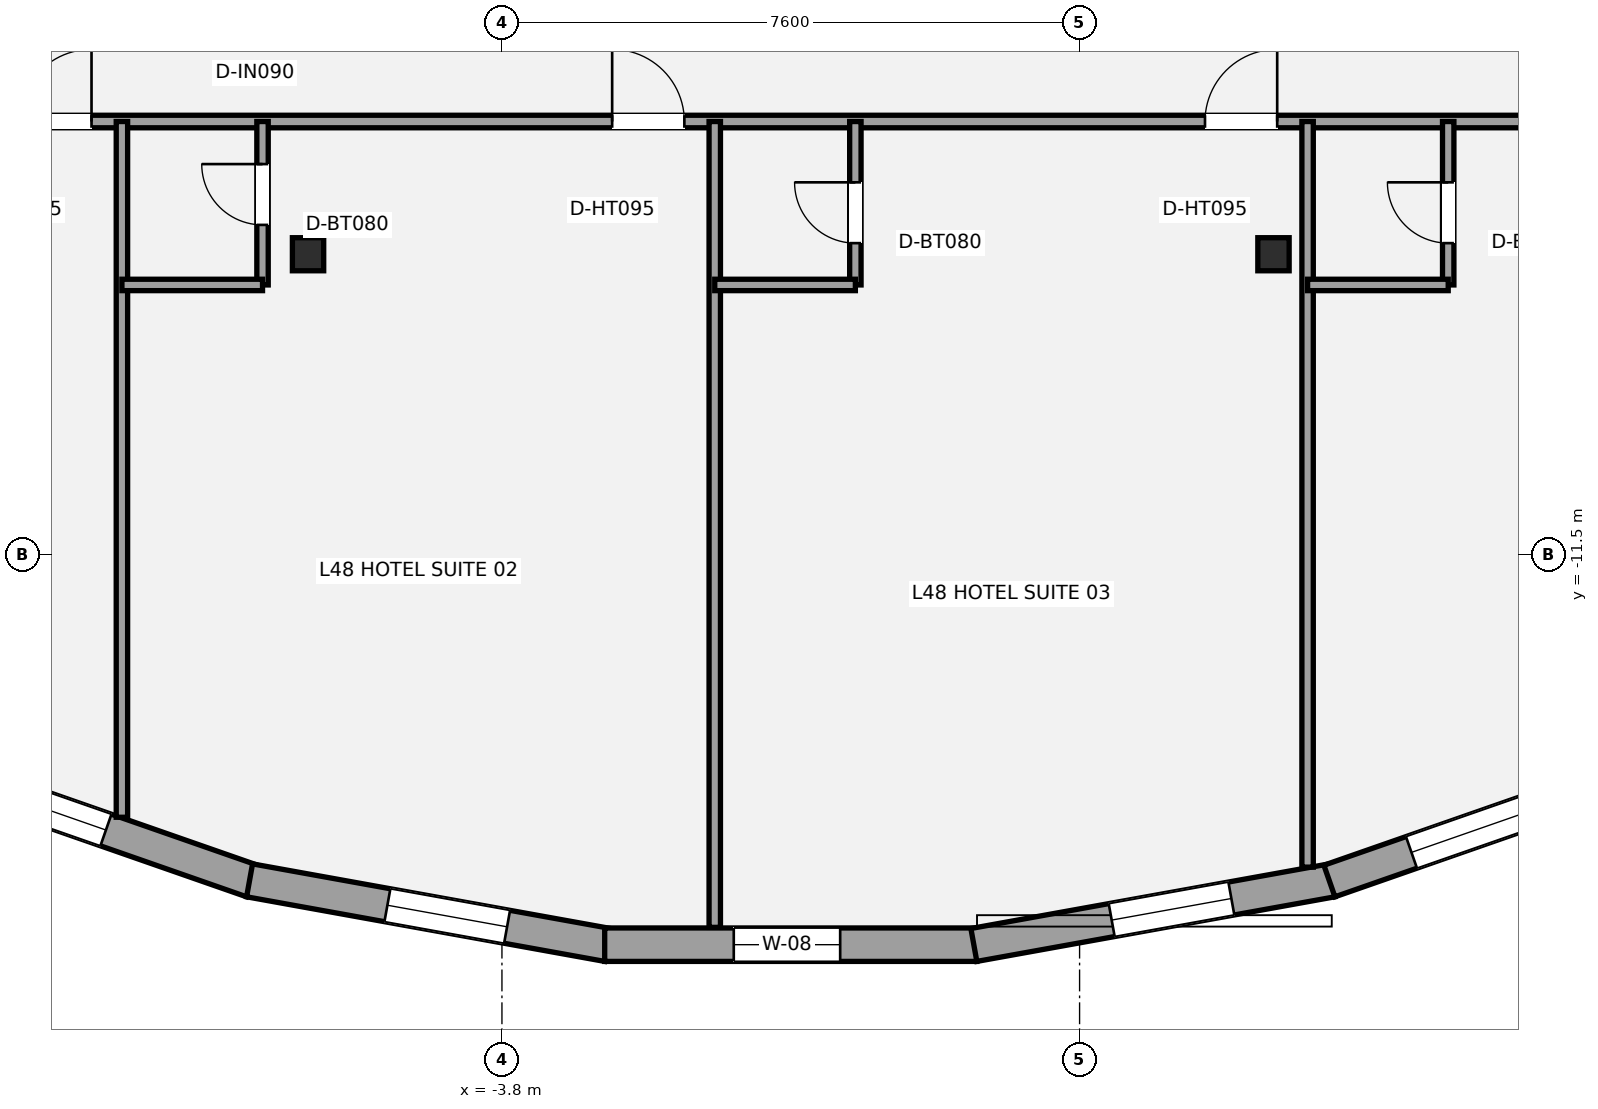
"""IFC4 building model, lengths in metres.
Left out: names, types, materials, properties, quantities, classifications, styles, units other than length and angle.
Written with IfcOpenShell. Run it as: python <this file> out.ifc"""

import sys

from ifc_helpers import new_model, si_unit, direction, frame, frame_2d, origin, origin_2d, place, context, subcontext, project, spatial, rectangle, i_section, extrude, element, fill, save


model = new_model("IFC4")
c1 = context("Model", 3, precision=1e-05, world=origin(), true_north=direction((0.0, 1.0)))
c2 = subcontext(c1, "Body", "Model", "MODEL_VIEW")
j1 = project(units=[si_unit("LENGTHUNIT", "METRE"), si_unit("PLANEANGLEUNIT", "RADIAN")], contexts=[c1])
p1 = place(None, origin())
s1 = spatial("IfcSite", under=j1, at=p1, CompositionType="ELEMENT")
p2 = place(p1, origin())
s2 = spatial("IfcBuilding", under=s1, at=p2, CompositionType="ELEMENT")
p3 = place(p2, frame((0.0, 0.0, 175.8)))
s3 = spatial("IfcBuildingStorey", under=s2, at=p3, CompositionType="ELEMENT", Elevation=175.8)
for number, where, z_axis, x_axis in (
    (1, (-6.351, -7.546, 0.0), (0.0, 0.0, 1.0), (1.0, 0.0, 0.0)),
    (2, (6.351, -7.546, 0.0), (0.0, 0.0, 1.0), (1.0, 0.0, 0.0)),
):
    element("IfcColumn", number, at=place(p3, frame(where, z_axis=z_axis, x_axis=x_axis)), inside=s3, PredefinedType="COLUMN", context=c2, shape_type="SweptSolid", body=[
        extrude(i_section(OverallWidth=0.412, OverallDepth=0.435, WebThickness=0.036, FlangeThickness=0.057, at=origin_2d()), origin(), (0.0, 0.0, 1.0), 3.2),
    ])
p4 = place(p3, frame((-7.087, -15.792, 0.0), z_axis=(0.0, 0.0, 1.0), x_axis=(-0.944223944927, 0.329304026434, 0.0)))
e3 = element("IfcWall", 3, at=p4, inside=s3, PredefinedType="STANDARD", context=c2, shape_type="SweptSolid", body=[
    extrude(rectangle(XDim=4.532, YDim=0.44, at=frame_2d((2.266, 0.0))), origin(), (0.0, 0.0, 1.0), 2.315),
])
p5 = place(p4, frame((2.037, 0.0, 0.58)))
e4 = element("IfcOpeningElement", 4, at=p5, cuts=e3, PredefinedType="OPENING", context=c2, shape_type="SweptSolid", body=[
    extrude(rectangle(XDim=1.6, YDim=1.55, at=frame_2d((0.8, 0.775))), frame((0.0, 0.23, 0.0), z_axis=(0.0, -1.0, 0.0), x_axis=(1.0, 0.0, 0.0)), (0.0, 0.0, 1.0), 0.46),
])
p6 = place(p3, frame((-2.409, -16.633, 0.0), z_axis=(0.0, 0.0, 1.0), x_axis=(-0.984108907768, 0.177565924803, 0.0)))
e5 = element("IfcWall", 5, at=p6, inside=s3, PredefinedType="STANDARD", context=c2, shape_type="SweptSolid", body=[
    extrude(rectangle(XDim=4.788, YDim=0.44, at=frame_2d((2.394, 0.0))), origin(), (0.0, 0.0, 1.0), 2.315),
])
p7 = place(p6, frame((1.345, 0.0, 0.58)))
e6 = element("IfcOpeningElement", 6, at=p7, cuts=e5, PredefinedType="OPENING", context=c2, shape_type="SweptSolid", body=[
    extrude(rectangle(XDim=1.6, YDim=1.55, at=frame_2d((0.8, 0.775))), frame((0.0, 0.23, 0.0), z_axis=(0.0, -1.0, 0.0), x_axis=(1.0, 0.0, 0.0)), (0.0, 0.0, 1.0), 0.46),
])
p8 = place(p3, frame((2.448, -16.63, 0.0), z_axis=(0.0, 0.0, 1.0), x_axis=(-1.0, 0.0, 0.0)))
e7 = element("IfcWall", 7, at=p8, inside=s3, PredefinedType="STANDARD", context=c2, shape_type="SweptSolid", body=[
    extrude(rectangle(XDim=4.896, YDim=0.44, at=frame_2d((2.448, 0.0))), origin(), (0.0, 0.0, 1.0), 2.315),
])
p9 = place(p8, frame((1.798, 0.0, 0.45)))
e8 = element("IfcOpeningElement", 8, at=p9, cuts=e7, PredefinedType="OPENING", context=c2, shape_type="SweptSolid", body=[
    extrude(rectangle(XDim=1.4, YDim=1.55, at=frame_2d((0.7, 0.775))), frame((0.0, 0.23, 0.0), z_axis=(0.0, -1.0, 0.0), x_axis=(1.0, 0.0, 0.0)), (0.0, 0.0, 1.0), 0.46),
])
p10 = place(p3, frame((7.12, -15.783, 0.0), z_axis=(0.0, 0.0, 1.0), x_axis=(-0.984108907768, -0.177565924803, 0.0)))
e9 = element("IfcWall", 9, at=p10, inside=s3, PredefinedType="STANDARD", context=c2, shape_type="SweptSolid", body=[
    extrude(rectangle(XDim=4.788, YDim=0.44, at=frame_2d((2.394, 0.0))), origin(), (0.0, 0.0, 1.0), 2.315),
])
p11 = place(p10, frame((1.345, 0.0, 0.58)))
e10 = element("IfcOpeningElement", 10, at=p11, cuts=e9, PredefinedType="OPENING", context=c2, shape_type="SweptSolid", body=[
    extrude(rectangle(XDim=1.6, YDim=1.55, at=frame_2d((0.8, 0.775))), frame((0.0, 0.23, 0.0), z_axis=(0.0, -1.0, 0.0), x_axis=(1.0, 0.0, 0.0)), (0.0, 0.0, 1.0), 0.46),
])
p12 = place(p3, frame((11.366, -14.3, 0.0), z_axis=(0.0, 0.0, 1.0), x_axis=(-0.944223944927, -0.329304026434, 0.0)))
e11 = element("IfcWall", 11, at=p12, inside=s3, PredefinedType="STANDARD", context=c2, shape_type="SweptSolid", body=[
    extrude(rectangle(XDim=4.532, YDim=0.44, at=frame_2d((2.266, 0.0))), origin(), (0.0, 0.0, 1.0), 2.315),
])
p13 = place(p12, frame((1.789, 0.0, 0.58)))
e12 = element("IfcOpeningElement", 12, at=p13, cuts=e11, PredefinedType="OPENING", context=c2, shape_type="SweptSolid", body=[
    extrude(rectangle(XDim=1.6, YDim=1.55, at=frame_2d((0.8, 0.775))), frame((0.0, 0.23, 0.0), z_axis=(0.0, -1.0, 0.0), x_axis=(1.0, 0.0, 0.0)), (0.0, 0.0, 1.0), 0.46),
])
p14 = place(p3, frame((-15.55, -5.8, 0.0), z_axis=(0.0, 0.0, 1.0), x_axis=(1.0, 0.0, 0.0)))
e13 = element("IfcWall", 13, at=p14, inside=s3, PredefinedType="PARTITIONING", context=c2, shape_type="SweptSolid", body=[
    extrude(rectangle(XDim=31.1, YDim=0.165, at=frame_2d((15.55, 0.0))), origin(), (0.0, 0.0, 1.0), 2.398),
])
p15 = place(p14, frame((5.4, 0.0, 0.0)))
e14 = element("IfcOpeningElement", 14, at=p15, cuts=e13, PredefinedType="OPENING", context=c2, shape_type="SweptSolid", body=[
    extrude(rectangle(XDim=0.95, YDim=2.15, at=frame_2d((0.475, 1.075))), frame((0.0, 0.093, 0.0), z_axis=(0.0, -1.0, 0.0), x_axis=(1.0, 0.0, 0.0)), (0.0, 0.0, 1.0), 0.185),
])
p16 = place(p14, frame((13.2, 0.0, 0.0)))
e15 = element("IfcOpeningElement", 15, at=p16, cuts=e13, PredefinedType="OPENING", context=c2, shape_type="SweptSolid", body=[
    extrude(rectangle(XDim=0.95, YDim=2.15, at=frame_2d((0.475, 1.075))), frame((0.0, 0.093, 0.0), z_axis=(0.0, -1.0, 0.0), x_axis=(1.0, 0.0, 0.0)), (0.0, 0.0, 1.0), 0.185),
])
p17 = place(p14, frame((21.0, 0.0, 0.0)))
e16 = element("IfcOpeningElement", 16, at=p17, cuts=e13, PredefinedType="OPENING", context=c2, shape_type="SweptSolid", body=[
    extrude(rectangle(XDim=0.95, YDim=2.15, at=frame_2d((0.475, 1.075))), frame((0.0, 0.093, 0.0), z_axis=(0.0, -1.0, 0.0), x_axis=(1.0, 0.0, 0.0)), (0.0, 0.0, 1.0), 0.185),
])
p18 = place(p14, frame((29.75, 0.0, 0.0)))
e17 = element("IfcOpeningElement", 17, at=p18, cuts=e13, PredefinedType="OPENING", context=c2, shape_type="SweptSolid", body=[
    extrude(rectangle(XDim=0.95, YDim=2.15, at=frame_2d((0.475, 1.075))), frame((0.0, 0.093, 0.0), z_axis=(0.0, -1.0, 0.0), x_axis=(1.0, 0.0, 0.0)), (0.0, 0.0, 1.0), 0.185),
])
p19 = place(p3, frame((-8.8, -14.953, 0.0), z_axis=(0.0, 0.0, 1.0), x_axis=(0.0, 1.0, 0.0)))
e18 = element("IfcWall", 18, at=p19, inside=s3, PredefinedType="PLUMBINGWALL", context=c2, shape_type="SweptSolid", body=[
    extrude(rectangle(XDim=9.153, YDim=0.15, at=frame_2d((4.577, 0.0))), origin(), (0.0, 0.0, 1.0), 3.02),
])
p20 = place(p3, frame((-1.0, -16.402, 0.0), z_axis=(0.0, 0.0, 1.0), x_axis=(0.0, 1.0, 0.0)))
e19 = element("IfcWall", 19, at=p20, inside=s3, PredefinedType="PLUMBINGWALL", context=c2, shape_type="SweptSolid", body=[
    extrude(rectangle(XDim=10.602, YDim=0.15, at=frame_2d((5.301, 0.0))), origin(), (0.0, 0.0, 1.0), 2.473),
])
p21 = place(p3, frame((6.8, -15.609, 0.0), z_axis=(0.0, 0.0, 1.0), x_axis=(0.0, 1.0, 0.0)))
e20 = element("IfcWall", 20, at=p21, inside=s3, PredefinedType="PLUMBINGWALL", context=c2, shape_type="SweptSolid", body=[
    extrude(rectangle(XDim=9.809, YDim=0.15, at=frame_2d((4.905, 0.0))), origin(), (0.0, 0.0, 1.0), 2.473),
])
p22 = place(p3, frame((-6.95, -7.95, 0.0), z_axis=(0.0, 0.0, 1.0), x_axis=(0.0, 1.0, 0.0)))
e21 = element("IfcWall", 21, at=p22, inside=s3, PredefinedType="PLUMBINGWALL", context=c2, shape_type="SweptSolid", body=[
    extrude(rectangle(XDim=2.15, YDim=0.15, at=frame_2d((1.075, 0.0))), origin(), (0.0, 0.0, 1.0), 2.473),
])
p23 = place(p22, frame((0.79, 0.0, 0.0)))
e22 = element("IfcOpeningElement", 22, at=p23, cuts=e21, PredefinedType="OPENING", context=c2, shape_type="SweptSolid", body=[
    extrude(rectangle(XDim=0.8, YDim=2.1, at=frame_2d((0.4, 1.05))), frame((0.0, 0.085, 0.0), z_axis=(0.0, -1.0, 0.0), x_axis=(1.0, 0.0, 0.0)), (0.0, 0.0, 1.0), 0.17),
])
p24 = place(p3, frame((-8.8, -7.95, 0.0), z_axis=(0.0, 0.0, 1.0), x_axis=(1.0, 0.0, 0.0)))
e23 = element("IfcWall", 23, at=p24, inside=s3, PredefinedType="PLUMBINGWALL", context=c2, shape_type="SweptSolid", body=[
    extrude(rectangle(XDim=1.85, YDim=0.15, at=frame_2d((0.925, 0.0))), origin(), (0.0, 0.0, 1.0), 2.473),
])
p25 = place(p3, frame((0.85, -7.95, 0.0), z_axis=(0.0, 0.0, 1.0), x_axis=(0.0, 1.0, 0.0)))
e24 = element("IfcWall", 24, at=p25, inside=s3, PredefinedType="PLUMBINGWALL", context=c2, shape_type="SweptSolid", body=[
    extrude(rectangle(XDim=2.15, YDim=0.15, at=frame_2d((1.075, 0.0))), origin(), (0.0, 0.0, 1.0), 3.02),
])
p26 = place(p25, frame((0.55, 0.0, 0.0)))
e25 = element("IfcOpeningElement", 25, at=p26, cuts=e24, PredefinedType="OPENING", context=c2, shape_type="SweptSolid", body=[
    extrude(rectangle(XDim=0.8, YDim=2.1, at=frame_2d((0.4, 1.05))), frame((0.0, 0.085, 0.0), z_axis=(0.0, -1.0, 0.0), x_axis=(1.0, 0.0, 0.0)), (0.0, 0.0, 1.0), 0.17),
])
p27 = place(p3, frame((-1.0, -7.95, 0.0), z_axis=(0.0, 0.0, 1.0), x_axis=(1.0, 0.0, 0.0)))
e26 = element("IfcWall", 26, at=p27, inside=s3, PredefinedType="PLUMBINGWALL", context=c2, shape_type="SweptSolid", body=[
    extrude(rectangle(XDim=1.85, YDim=0.15, at=frame_2d((0.925, 0.0))), origin(), (0.0, 0.0, 1.0), 3.02),
])
p28 = place(p3, frame((8.65, -7.95, 0.0), z_axis=(0.0, 0.0, 1.0), x_axis=(0.0, 1.0, 0.0)))
e27 = element("IfcWall", 27, at=p28, inside=s3, PredefinedType="PLUMBINGWALL", context=c2, shape_type="SweptSolid", body=[
    extrude(rectangle(XDim=2.15, YDim=0.15, at=frame_2d((1.075, 0.0))), origin(), (0.0, 0.0, 1.0), 3.02),
])
p29 = place(p28, frame((0.55, 0.0, 0.0)))
e28 = element("IfcOpeningElement", 28, at=p29, cuts=e27, PredefinedType="OPENING", context=c2, shape_type="SweptSolid", body=[
    extrude(rectangle(XDim=0.8, YDim=2.1, at=frame_2d((0.4, 1.05))), frame((0.0, 0.085, 0.0), z_axis=(0.0, -1.0, 0.0), x_axis=(1.0, 0.0, 0.0)), (0.0, 0.0, 1.0), 0.17),
])
p30 = place(p3, frame((6.8, -7.95, 0.0), z_axis=(0.0, 0.0, 1.0), x_axis=(1.0, 0.0, 0.0)))
e29 = element("IfcWall", 29, at=p30, inside=s3, PredefinedType="PLUMBINGWALL", context=c2, shape_type="SweptSolid", body=[
    extrude(rectangle(XDim=1.85, YDim=0.15, at=frame_2d((0.925, 0.0))), origin(), (0.0, 0.0, 1.0), 3.02),
])
p31 = place(p5, origin())
e30 = element("IfcWindow", 30, at=p31, inside=s3, PartitioningType="SINGLE_PANEL", PredefinedType="WINDOW", context=c2, shape_type="SweptSolid", body=[
    extrude(rectangle(XDim=1.6, YDim=1.55, at=frame_2d((0.8, 0.775))), frame((0.0, -0.01, 0.0), z_axis=(0.0, -1.0, 0.0), x_axis=(1.0, 0.0, 0.0)), (0.0, 0.0, 1.0), 0.06),
])
fill(e4, e30)
p32 = place(p7, origin())
e31 = element("IfcWindow", 31, at=p32, inside=s3, PartitioningType="SINGLE_PANEL", PredefinedType="WINDOW", context=c2, shape_type="SweptSolid", body=[
    extrude(rectangle(XDim=1.6, YDim=1.55, at=frame_2d((0.8, 0.775))), frame((0.0, -0.01, 0.0), z_axis=(0.0, -1.0, 0.0), x_axis=(1.0, 0.0, 0.0)), (0.0, 0.0, 1.0), 0.06),
])
fill(e6, e31)
p33 = place(p9, origin())
e32 = element("IfcWindow", 32, at=p33, inside=s3, PartitioningType="SINGLE_PANEL", PredefinedType="WINDOW", context=c2, shape_type="SweptSolid", body=[
    extrude(rectangle(XDim=1.4, YDim=1.55, at=frame_2d((0.7, 0.775))), frame((0.0, -0.01, 0.0), z_axis=(0.0, -1.0, 0.0), x_axis=(1.0, 0.0, 0.0)), (0.0, 0.0, 1.0), 0.06),
])
fill(e8, e32)
p34 = place(p11, origin())
e33 = element("IfcWindow", 33, at=p34, inside=s3, PartitioningType="SINGLE_PANEL", PredefinedType="WINDOW", context=c2, shape_type="SweptSolid", body=[
    extrude(rectangle(XDim=1.6, YDim=1.55, at=frame_2d((0.8, 0.775))), frame((0.0, -0.01, 0.0), z_axis=(0.0, -1.0, 0.0), x_axis=(1.0, 0.0, 0.0)), (0.0, 0.0, 1.0), 0.06),
])
fill(e10, e33)
p35 = place(p13, origin())
e34 = element("IfcWindow", 34, at=p35, inside=s3, PartitioningType="SINGLE_PANEL", PredefinedType="WINDOW", context=c2, shape_type="SweptSolid", body=[
    extrude(rectangle(XDim=1.6, YDim=1.55, at=frame_2d((0.8, 0.775))), frame((0.0, -0.01, 0.0), z_axis=(0.0, -1.0, 0.0), x_axis=(1.0, 0.0, 0.0)), (0.0, 0.0, 1.0), 0.06),
])
fill(e12, e34)
p36 = place(p15, origin())
e35 = element("IfcDoor", 35, at=p36, inside=s3, OperationType="SINGLE_SWING_RIGHT", PredefinedType="DOOR", context=c2, shape_type="SweptSolid", body=[
    extrude(rectangle(XDim=0.95, YDim=2.15, at=frame_2d((0.475, 1.075))), frame((0.0, 0.025, 0.0), z_axis=(0.0, -1.0, 0.0), x_axis=(1.0, 0.0, 0.0)), (0.0, 0.0, 1.0), 0.05),
])
fill(e14, e35)
p37 = place(p16, origin())
e36 = element("IfcDoor", 36, at=p37, inside=s3, OperationType="SINGLE_SWING_LEFT", PredefinedType="DOOR", context=c2, shape_type="SweptSolid", body=[
    extrude(rectangle(XDim=0.95, YDim=2.15, at=frame_2d((0.475, 1.075))), frame((0.0, 0.025, 0.0), z_axis=(0.0, -1.0, 0.0), x_axis=(1.0, 0.0, 0.0)), (0.0, 0.0, 1.0), 0.05),
])
fill(e15, e36)
p38 = place(p23, origin())
e37 = element("IfcDoor", 37, at=p38, inside=s3, OperationType="SINGLE_SWING_RIGHT", PredefinedType="DOOR", context=c2, shape_type="SweptSolid", body=[
    extrude(rectangle(XDim=0.8, YDim=2.1, at=frame_2d((0.4, 1.05))), frame((0.0, 0.025, 0.0), z_axis=(0.0, -1.0, 0.0), x_axis=(1.0, 0.0, 0.0)), (0.0, 0.0, 1.0), 0.05),
])
fill(e22, e37)
p39 = place(p17, origin())
e38 = element("IfcDoor", 38, at=p39, inside=s3, OperationType="SINGLE_SWING_RIGHT", PredefinedType="DOOR", context=c2, shape_type="SweptSolid", body=[
    extrude(rectangle(XDim=0.95, YDim=2.15, at=frame_2d((0.475, 1.075))), frame((0.0, 0.025, 0.0), z_axis=(0.0, -1.0, 0.0), x_axis=(1.0, 0.0, 0.0)), (0.0, 0.0, 1.0), 0.05),
])
fill(e16, e38)
p40 = place(p26, origin())
e39 = element("IfcDoor", 39, at=p40, inside=s3, OperationType="SINGLE_SWING_RIGHT", PredefinedType="DOOR", context=c2, shape_type="SweptSolid", body=[
    extrude(rectangle(XDim=0.8, YDim=2.1, at=frame_2d((0.4, 1.05))), frame((0.0, 0.025, 0.0), z_axis=(0.0, -1.0, 0.0), x_axis=(1.0, 0.0, 0.0)), (0.0, 0.0, 1.0), 0.05),
])
fill(e25, e39)
p41 = place(p29, origin())
e40 = element("IfcDoor", 40, at=p41, inside=s3, OperationType="SINGLE_SWING_RIGHT", PredefinedType="DOOR", context=c2, shape_type="SweptSolid", body=[
    extrude(rectangle(XDim=0.8, YDim=2.1, at=frame_2d((0.4, 1.05))), frame((0.0, 0.025, 0.0), z_axis=(0.0, -1.0, 0.0), x_axis=(1.0, 0.0, 0.0)), (0.0, 0.0, 1.0), 0.05),
])
fill(e28, e40)
save(model, sys.argv[1])
